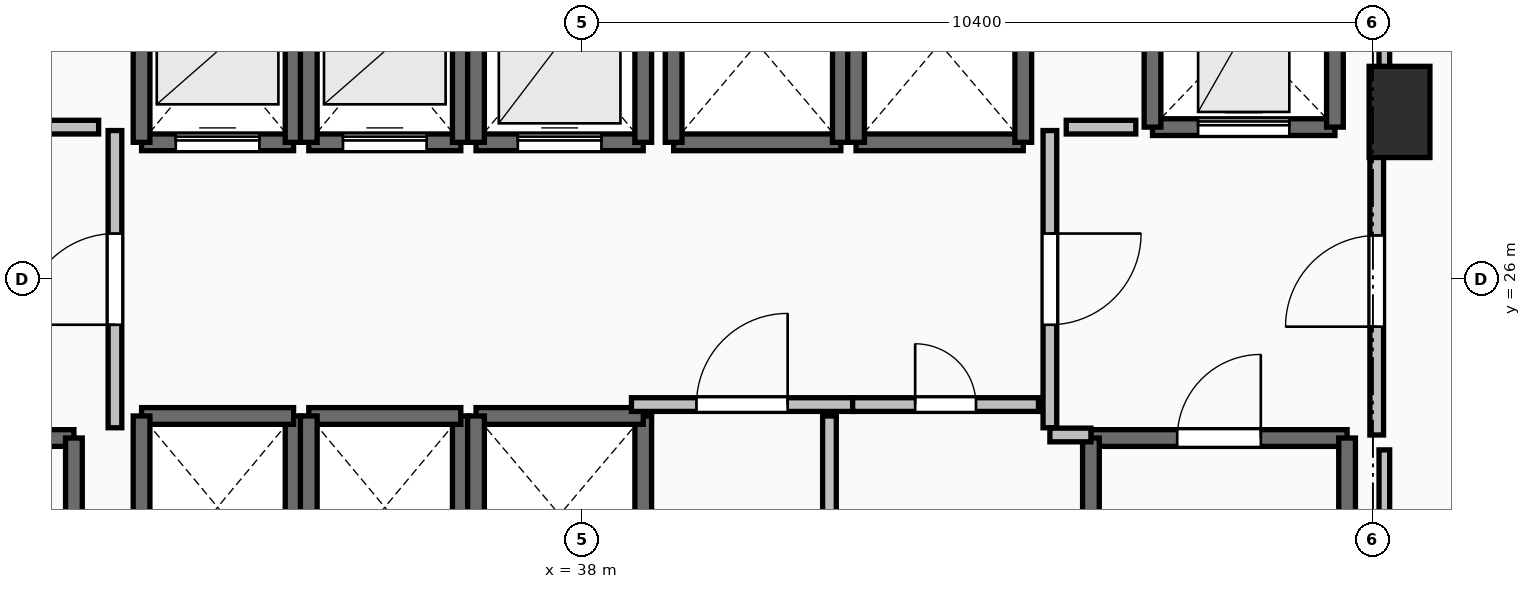
"""IFC4 building model, lengths in metres.
Left out: names, types, materials, properties, quantities, classifications, styles, units other than length and angle.
Written with IfcOpenShell. Run it as: python <this file> out.ifc"""

import sys

from ifc_helpers import new_model, si_unit, direction, frame, frame_2d, origin, origin_2d, place, context, subcontext, project, spatial, rectangle, extrude, element, fill, save


model = new_model("IFC4")
c1 = context("Model", 3, precision=1e-05, world=origin(), true_north=direction((0.0, 1.0)))
c2 = subcontext(c1, "Body", "Model", "MODEL_VIEW")
j1 = project(units=[si_unit("LENGTHUNIT", "METRE"), si_unit("PLANEANGLEUNIT", "RADIAN")], contexts=[c1])
p1 = place(None, origin())
s1 = spatial("IfcSite", under=j1, at=p1, CompositionType="ELEMENT")
p2 = place(p1, origin())
s2 = spatial("IfcBuilding", under=s1, at=p2, CompositionType="ELEMENT")
p3 = place(p2, frame((0.0, 0.0, 31.0)))
s3 = spatial("IfcBuildingStorey", under=s2, at=p3, CompositionType="ELEMENT", Elevation=31.0)
p4 = place(p3, frame((48.75, 28.2, 0.0), z_axis=(0.0, 0.0, 1.0), x_axis=(1.0, 0.0, 0.0)))
e1 = element("IfcColumn", 1, at=p4, inside=s3, PredefinedType="PILASTER", context=c2, shape_type="SweptSolid", body=[
    extrude(rectangle(XDim=0.8, YDim=1.2, at=origin_2d()), origin(), (0.0, 0.0, 1.0), 3.5),
])
p5 = place(p3, frame((27.94, 23.91, 0.0), z_axis=(0.0, 0.0, 1.0), x_axis=(1.0, 0.0, 0.0)))
e2 = element("IfcWall", 2, at=p5, inside=s3, PredefinedType="SOLIDWALL", context=c2, shape_type="SweptSolid", body=[
    extrude(rectangle(XDim=3.37, YDim=0.22, at=frame_2d((1.685, 0.0))), origin(), (0.0, 0.0, 1.0), 3.24),
])
p6 = place(p5, frame((1.135, 0.0, 0.0)))
e3 = element("IfcOpeningElement", 3, at=p6, cuts=e2, PredefinedType="OPENING", context=c2, shape_type="SweptSolid", body=[
    extrude(rectangle(XDim=1.1, YDim=2.15, at=frame_2d((0.55, 1.075))), frame((0.0, 0.125, 0.0), z_axis=(0.0, -1.0, 0.0), x_axis=(1.0, 0.0, 0.0)), (0.0, 0.0, 1.0), 0.25),
])
p7 = place(p3, frame((31.31, 23.91, 0.0), z_axis=(0.0, 0.0, 1.0), x_axis=(0.0, -1.0, 0.0)))
e4 = element("IfcWall", 4, at=p7, inside=s3, PredefinedType="SOLIDWALL", context=c2, shape_type="SweptSolid", body=[
    extrude(rectangle(XDim=7.42, YDim=0.22, at=frame_2d((3.71, 0.0))), origin(), (0.0, 0.0, 1.0), 3.24),
])
p8 = place(p3, frame((44.69, 23.91, 0.0), z_axis=(0.0, 0.0, 1.0), x_axis=(1.0, 0.0, 0.0)))
e5 = element("IfcWall", 5, at=p8, inside=s3, PredefinedType="SOLIDWALL", context=c2, shape_type="SweptSolid", body=[
    extrude(rectangle(XDim=3.37, YDim=0.22, at=frame_2d((1.685, 0.0))), origin(), (0.0, 0.0, 1.0), 3.24),
])
p9 = place(p8, frame((1.135, 0.0, 0.0)))
e6 = element("IfcOpeningElement", 6, at=p9, cuts=e5, PredefinedType="OPENING", context=c2, shape_type="SweptSolid", body=[
    extrude(rectangle(XDim=1.1, YDim=2.15, at=frame_2d((0.55, 1.075))), frame((0.0, 0.125, 0.0), z_axis=(0.0, -1.0, 0.0), x_axis=(1.0, 0.0, 0.0)), (0.0, 0.0, 1.0), 0.25),
])
for number, where, z_axis, x_axis in (
    (7, (48.06, 23.91, 0.0), (0.0, 0.0, 1.0), (0.0, -1.0, 0.0)),
    (8, (44.69, 16.49, 0.0), (0.0, 0.0, 1.0), (0.0, 1.0, 0.0)),
):
    element("IfcWall", number, at=place(p3, frame(where, z_axis=z_axis, x_axis=x_axis)), inside=s3, PredefinedType="SOLIDWALL", context=c2, shape_type="SweptSolid", body=[
        extrude(rectangle(XDim=7.42, YDim=0.22, at=frame_2d((3.71, 0.0))), origin(), (0.0, 0.0, 1.0), 3.24),
    ])
p10 = place(p3, frame((32.2, 27.8, 0.0), z_axis=(0.0, 0.0, 1.0), x_axis=(1.0, 0.0, 0.0)))
e9 = element("IfcWall", 9, at=p10, inside=s3, PredefinedType="SOLIDWALL", context=c2, shape_type="SweptSolid", body=[
    extrude(rectangle(XDim=2.0, YDim=0.22, at=frame_2d((1.0, 0.0))), origin(), (0.0, 0.0, 1.0), 3.24),
])
p11 = place(p10, frame((0.45, 0.0, 0.0)))
e10 = element("IfcOpeningElement", 10, at=p11, cuts=e9, PredefinedType="OPENING", context=c2, shape_type="SweptSolid", body=[
    extrude(rectangle(XDim=1.1, YDim=2.2, at=frame_2d((0.55, 1.1))), frame((0.0, 0.125, 0.0), z_axis=(0.0, -1.0, 0.0), x_axis=(1.0, 0.0, 0.0)), (0.0, 0.0, 1.0), 0.25),
])
for number, where, z_axis, x_axis in (
    (11, (34.2, 27.8, 0.0), (0.0, 0.0, 1.0), (0.0, 1.0, 0.0)),
    (12, (32.2, 30.2, 0.0), (0.0, 0.0, 1.0), (0.0, -1.0, 0.0)),
):
    element("IfcWall", number, at=place(p3, frame(where, z_axis=z_axis, x_axis=x_axis)), inside=s3, PredefinedType="SOLIDWALL", context=c2, shape_type="SweptSolid", body=[
        extrude(rectangle(XDim=2.4, YDim=0.22, at=frame_2d((1.2, 0.0))), origin(), (0.0, 0.0, 1.0), 3.24),
    ])
p12 = place(p3, frame((34.4, 27.8, 0.0), z_axis=(0.0, 0.0, 1.0), x_axis=(1.0, 0.0, 0.0)))
e13 = element("IfcWall", 13, at=p12, inside=s3, PredefinedType="SOLIDWALL", context=c2, shape_type="SweptSolid", body=[
    extrude(rectangle(XDim=2.0, YDim=0.22, at=frame_2d((1.0, 0.0))), origin(), (0.0, 0.0, 1.0), 3.24),
])
p13 = place(p12, frame((0.45, 0.0, 0.0)))
e14 = element("IfcOpeningElement", 14, at=p13, cuts=e13, PredefinedType="OPENING", context=c2, shape_type="SweptSolid", body=[
    extrude(rectangle(XDim=1.1, YDim=2.2, at=frame_2d((0.55, 1.1))), frame((0.0, 0.125, 0.0), z_axis=(0.0, -1.0, 0.0), x_axis=(1.0, 0.0, 0.0)), (0.0, 0.0, 1.0), 0.25),
])
for number, where, z_axis, x_axis in (
    (15, (36.4, 27.8, 0.0), (0.0, 0.0, 1.0), (0.0, 1.0, 0.0)),
    (16, (34.4, 30.2, 0.0), (0.0, 0.0, 1.0), (0.0, -1.0, 0.0)),
):
    element("IfcWall", number, at=place(p3, frame(where, z_axis=z_axis, x_axis=x_axis)), inside=s3, PredefinedType="SOLIDWALL", context=c2, shape_type="SweptSolid", body=[
        extrude(rectangle(XDim=2.4, YDim=0.22, at=frame_2d((1.2, 0.0))), origin(), (0.0, 0.0, 1.0), 3.24),
    ])
p14 = place(p3, frame((36.6, 27.8, 0.0), z_axis=(0.0, 0.0, 1.0), x_axis=(1.0, 0.0, 0.0)))
e17 = element("IfcWall", 17, at=p14, inside=s3, PredefinedType="SOLIDWALL", context=c2, shape_type="SweptSolid", body=[
    extrude(rectangle(XDim=2.2, YDim=0.22, at=frame_2d((1.1, 0.0))), origin(), (0.0, 0.0, 1.0), 3.24),
])
p15 = place(p14, frame((0.55, 0.0, 0.0)))
e18 = element("IfcOpeningElement", 18, at=p15, cuts=e17, PredefinedType="OPENING", context=c2, shape_type="SweptSolid", body=[
    extrude(rectangle(XDim=1.1, YDim=2.2, at=frame_2d((0.55, 1.1))), frame((0.0, 0.125, 0.0), z_axis=(0.0, -1.0, 0.0), x_axis=(1.0, 0.0, 0.0)), (0.0, 0.0, 1.0), 0.25),
])
for number, where, z_axis, x_axis in (
    (19, (38.8, 27.8, 0.0), (0.0, 0.0, 1.0), (0.0, 1.0, 0.0)),
    (20, (36.6, 30.4, 0.0), (0.0, 0.0, 1.0), (0.0, -1.0, 0.0)),
):
    element("IfcWall", number, at=place(p3, frame(where, z_axis=z_axis, x_axis=x_axis)), inside=s3, PredefinedType="SOLIDWALL", context=c2, shape_type="SweptSolid", body=[
        extrude(rectangle(XDim=2.6, YDim=0.22, at=frame_2d((1.3, 0.0))), origin(), (0.0, 0.0, 1.0), 3.24),
    ])
p16 = place(p3, frame((34.2, 21.8, 0.0), z_axis=(0.0, 0.0, 1.0), x_axis=(0.0, 1.0, 0.0)))
e21 = element("IfcWall", 21, at=p16, inside=s3, PredefinedType="SOLIDWALL", context=c2, shape_type="SweptSolid", body=[
    extrude(rectangle(XDim=2.4, YDim=0.22, at=frame_2d((1.2, 0.0))), origin(), (0.0, 0.0, 1.0), 3.24),
])
p17 = place(p3, frame((34.2, 24.2, 0.0), z_axis=(0.0, 0.0, 1.0), x_axis=(-1.0, 0.0, 0.0)))
e22 = element("IfcWall", 22, at=p17, inside=s3, PredefinedType="SOLIDWALL", context=c2, shape_type="SweptSolid", body=[
    extrude(rectangle(XDim=2.0, YDim=0.22, at=frame_2d((1.0, 0.0))), origin(), (0.0, 0.0, 1.0), 3.24),
])
for number, where, z_axis, x_axis in (
    (23, (32.2, 24.2, 0.0), (0.0, 0.0, 1.0), (0.0, -1.0, 0.0)),
    (24, (36.4, 21.8, 0.0), (0.0, 0.0, 1.0), (0.0, 1.0, 0.0)),
):
    element("IfcWall", number, at=place(p3, frame(where, z_axis=z_axis, x_axis=x_axis)), inside=s3, PredefinedType="SOLIDWALL", context=c2, shape_type="SweptSolid", body=[
        extrude(rectangle(XDim=2.4, YDim=0.22, at=frame_2d((1.2, 0.0))), origin(), (0.0, 0.0, 1.0), 3.24),
    ])
p18 = place(p3, frame((36.4, 24.2, 0.0), z_axis=(0.0, 0.0, 1.0), x_axis=(-1.0, 0.0, 0.0)))
e25 = element("IfcWall", 25, at=p18, inside=s3, PredefinedType="SOLIDWALL", context=c2, shape_type="SweptSolid", body=[
    extrude(rectangle(XDim=2.0, YDim=0.22, at=frame_2d((1.0, 0.0))), origin(), (0.0, 0.0, 1.0), 3.24),
])
p19 = place(p3, frame((34.4, 24.2, 0.0), z_axis=(0.0, 0.0, 1.0), x_axis=(0.0, -1.0, 0.0)))
e26 = element("IfcWall", 26, at=p19, inside=s3, PredefinedType="SOLIDWALL", context=c2, shape_type="SweptSolid", body=[
    extrude(rectangle(XDim=2.4, YDim=0.22, at=frame_2d((1.2, 0.0))), origin(), (0.0, 0.0, 1.0), 3.24),
])
p20 = place(p3, frame((38.8, 21.6, 0.0), z_axis=(0.0, 0.0, 1.0), x_axis=(0.0, 1.0, 0.0)))
e27 = element("IfcWall", 27, at=p20, inside=s3, PredefinedType="SOLIDWALL", context=c2, shape_type="SweptSolid", body=[
    extrude(rectangle(XDim=2.6, YDim=0.22, at=frame_2d((1.3, 0.0))), origin(), (0.0, 0.0, 1.0), 3.24),
])
p21 = place(p3, frame((38.8, 24.2, 0.0), z_axis=(0.0, 0.0, 1.0), x_axis=(-1.0, 0.0, 0.0)))
e28 = element("IfcWall", 28, at=p21, inside=s3, PredefinedType="SOLIDWALL", context=c2, shape_type="SweptSolid", body=[
    extrude(rectangle(XDim=2.2, YDim=0.22, at=frame_2d((1.1, 0.0))), origin(), (0.0, 0.0, 1.0), 3.24),
])
p22 = place(p3, frame((36.6, 24.2, 0.0), z_axis=(0.0, 0.0, 1.0), x_axis=(0.0, -1.0, 0.0)))
e29 = element("IfcWall", 29, at=p22, inside=s3, PredefinedType="SOLIDWALL", context=c2, shape_type="SweptSolid", body=[
    extrude(rectangle(XDim=2.6, YDim=0.22, at=frame_2d((1.3, 0.0))), origin(), (0.0, 0.0, 1.0), 3.24),
])
p23 = place(p3, frame((39.2, 27.8, 0.0), z_axis=(0.0, 0.0, 1.0), x_axis=(1.0, 0.0, 0.0)))
e30 = element("IfcWall", 30, at=p23, inside=s3, PredefinedType="SOLIDWALL", context=c2, shape_type="SweptSolid", body=[
    extrude(rectangle(XDim=2.2, YDim=0.22, at=frame_2d((1.1, 0.0))), origin(), (0.0, 0.0, 1.0), 3.24),
])
for number, where, z_axis, x_axis in (
    (31, (41.4, 27.8, 0.0), (0.0, 0.0, 1.0), (0.0, 1.0, 0.0)),
    (32, (39.2, 30.4, 0.0), (0.0, 0.0, 1.0), (0.0, -1.0, 0.0)),
):
    element("IfcWall", number, at=place(p3, frame(where, z_axis=z_axis, x_axis=x_axis)), inside=s3, PredefinedType="SOLIDWALL", context=c2, shape_type="SweptSolid", body=[
        extrude(rectangle(XDim=2.6, YDim=0.22, at=frame_2d((1.3, 0.0))), origin(), (0.0, 0.0, 1.0), 3.24),
    ])
p24 = place(p3, frame((41.6, 27.8, 0.0), z_axis=(0.0, 0.0, 1.0), x_axis=(1.0, 0.0, 0.0)))
e33 = element("IfcWall", 33, at=p24, inside=s3, PredefinedType="SOLIDWALL", context=c2, shape_type="SweptSolid", body=[
    extrude(rectangle(XDim=2.2, YDim=0.22, at=frame_2d((1.1, 0.0))), origin(), (0.0, 0.0, 1.0), 3.24),
])
for number, where, z_axis, x_axis in (
    (34, (43.8, 27.8, 0.0), (0.0, 0.0, 1.0), (0.0, 1.0, 0.0)),
    (35, (41.6, 30.4, 0.0), (0.0, 0.0, 1.0), (0.0, -1.0, 0.0)),
):
    element("IfcWall", number, at=place(p3, frame(where, z_axis=z_axis, x_axis=x_axis)), inside=s3, PredefinedType="SOLIDWALL", context=c2, shape_type="SweptSolid", body=[
        extrude(rectangle(XDim=2.6, YDim=0.22, at=frame_2d((1.3, 0.0))), origin(), (0.0, 0.0, 1.0), 3.24),
    ])
p25 = place(p3, frame((45.5, 28.0, 0.0), z_axis=(0.0, 0.0, 1.0), x_axis=(1.0, 0.0, 0.0)))
e36 = element("IfcWall", 36, at=p25, inside=s3, PredefinedType="SHEAR", context=c2, shape_type="SweptSolid", body=[
    extrude(rectangle(XDim=2.4, YDim=0.22, at=frame_2d((1.2, 0.0))), origin(), (0.0, 0.0, 1.0), 3.24),
])
p26 = place(p25, frame((0.6, 0.0, 0.0)))
e37 = element("IfcOpeningElement", 37, at=p26, cuts=e36, PredefinedType="OPENING", context=c2, shape_type="SweptSolid", body=[
    extrude(rectangle(XDim=1.2, YDim=2.2, at=frame_2d((0.6, 1.1))), frame((0.0, 0.125, 0.0), z_axis=(0.0, -1.0, 0.0), x_axis=(1.0, 0.0, 0.0)), (0.0, 0.0, 1.0), 0.25),
])
for number, where, z_axis, x_axis in (
    (38, (47.9, 28.0, 0.0), (0.0, 0.0, 1.0), (0.0, 1.0, 0.0)),
    (39, (45.5, 30.5, 0.0), (0.0, 0.0, 1.0), (0.0, -1.0, 0.0)),
):
    element("IfcWall", number, at=place(p3, frame(where, z_axis=z_axis, x_axis=x_axis)), inside=s3, PredefinedType="SHEAR", context=c2, shape_type="SweptSolid", body=[
        extrude(rectangle(XDim=2.5, YDim=0.22, at=frame_2d((1.25, 0.0))), origin(), (0.0, 0.0, 1.0), 3.24),
    ])
p27 = place(p3, frame((31.85, 24.045, 0.0), z_axis=(0.0, 0.0, 1.0), x_axis=(0.0, 1.0, 0.0)))
e40 = element("IfcWall", 40, at=p27, inside=s3, PredefinedType="PARTITIONING", context=c2, shape_type="SweptSolid", body=[
    extrude(rectangle(XDim=3.91, YDim=0.18, at=frame_2d((1.955, 0.0))), origin(), (0.0, 0.0, 1.0), 3.24),
])
p28 = place(p27, frame((1.355, 0.0, 0.0)))
e41 = element("IfcOpeningElement", 41, at=p28, cuts=e40, PredefinedType="OPENING", context=c2, shape_type="SweptSolid", body=[
    extrude(rectangle(XDim=1.2, YDim=2.15, at=frame_2d((0.6, 1.075))), frame((0.0, 0.105, 0.0), z_axis=(0.0, -1.0, 0.0), x_axis=(1.0, 0.0, 0.0)), (0.0, 0.0, 1.0), 0.21),
])
p29 = place(p3, frame((44.15, 27.955, 0.0), z_axis=(0.0, 0.0, 1.0), x_axis=(0.0, -1.0, 0.0)))
e42 = element("IfcWall", 42, at=p29, inside=s3, PredefinedType="PARTITIONING", context=c2, shape_type="SweptSolid", body=[
    extrude(rectangle(XDim=3.91, YDim=0.18, at=frame_2d((1.955, 0.0))), origin(), (0.0, 0.0, 1.0), 3.24),
])
p30 = place(p29, frame((1.355, 0.0, 0.0)))
e43 = element("IfcOpeningElement", 43, at=p30, cuts=e42, PredefinedType="OPENING", context=c2, shape_type="SweptSolid", body=[
    extrude(rectangle(XDim=1.2, YDim=2.15, at=frame_2d((0.6, 1.075))), frame((0.0, 0.105, 0.0), z_axis=(0.0, -1.0, 0.0), x_axis=(1.0, 0.0, 0.0)), (0.0, 0.0, 1.0), 0.21),
])
p31 = place(p3, frame((44.15, 23.95, 0.0), z_axis=(0.0, 0.0, 1.0), x_axis=(1.0, 0.0, 0.0)))
e44 = element("IfcWall", 44, at=p31, inside=s3, PredefinedType="PARTITIONING", context=c2, shape_type="SweptSolid", body=[
    extrude(rectangle(XDim=0.54, YDim=0.18, at=frame_2d((0.27, 0.0))), origin(), (0.0, 0.0, 1.0), 3.24),
])
p32 = place(p3, frame((48.45, 23.95, 0.0), z_axis=(0.0, 0.0, 1.0), x_axis=(0.0, 1.0, 0.0)))
e45 = element("IfcWall", 45, at=p32, inside=s3, PredefinedType="PARTITIONING", context=c2, shape_type="SweptSolid", body=[
    extrude(rectangle(XDim=4.05, YDim=0.18, at=frame_2d((2.025, 0.0))), origin(), (0.0, 0.0, 1.0), 3.24),
])
p33 = place(p32, frame((1.425, 0.0, 0.0)))
e46 = element("IfcOpeningElement", 46, at=p33, cuts=e45, PredefinedType="OPENING", context=c2, shape_type="SweptSolid", body=[
    extrude(rectangle(XDim=1.2, YDim=2.15, at=frame_2d((0.6, 1.075))), frame((0.0, 0.105, 0.0), z_axis=(0.0, -1.0, 0.0), x_axis=(1.0, 0.0, 0.0)), (0.0, 0.0, 1.0), 0.21),
])
p34 = place(p3, frame((38.645, 24.35, 0.0), z_axis=(0.0, 0.0, 1.0), x_axis=(1.0, 0.0, 0.0)))
e47 = element("IfcWall", 47, at=p34, inside=s3, PredefinedType="PARTITIONING", context=c2, shape_type="SweptSolid", body=[
    extrude(rectangle(XDim=2.91, YDim=0.18, at=frame_2d((1.455, 0.0))), origin(), (0.0, 0.0, 1.0), 3.24),
])
p35 = place(p34, frame((0.855, 0.0, 0.0)))
e48 = element("IfcOpeningElement", 48, at=p35, cuts=e47, PredefinedType="OPENING", context=c2, shape_type="SweptSolid", body=[
    extrude(rectangle(XDim=1.2, YDim=2.15, at=frame_2d((0.6, 1.075))), frame((0.0, 0.105, 0.0), z_axis=(0.0, -1.0, 0.0), x_axis=(1.0, 0.0, 0.0)), (0.0, 0.0, 1.0), 0.21),
])
p36 = place(p3, frame((41.555, 24.35, 0.0), z_axis=(0.0, 0.0, 1.0), x_axis=(1.0, 0.0, 0.0)))
e49 = element("IfcWall", 49, at=p36, inside=s3, PredefinedType="PARTITIONING", context=c2, shape_type="SweptSolid", body=[
    extrude(rectangle(XDim=2.445, YDim=0.18, at=frame_2d((1.223, 0.0))), origin(), (0.0, 0.0, 1.0), 3.24),
])
p37 = place(p36, frame((0.823, 0.0, 0.0)))
e50 = element("IfcOpeningElement", 50, at=p37, cuts=e49, PredefinedType="OPENING", context=c2, shape_type="SweptSolid", body=[
    extrude(rectangle(XDim=0.8, YDim=2.05, at=frame_2d((0.4, 1.025))), frame((0.0, 0.105, 0.0), z_axis=(0.0, -1.0, 0.0), x_axis=(1.0, 0.0, 0.0)), (0.0, 0.0, 1.0), 0.21),
])
p38 = place(p3, frame((41.25, 16.32, 0.0), z_axis=(0.0, 0.0, 1.0), x_axis=(0.0, 1.0, 0.0)))
e51 = element("IfcWall", 51, at=p38, inside=s3, PredefinedType="PARTITIONING", context=c2, shape_type="SweptSolid", body=[
    extrude(rectangle(XDim=7.88, YDim=0.18, at=frame_2d((3.94, 0.0))), origin(), (0.0, 0.0, 1.0), 3.24),
])
p39 = place(p38, frame((3.54, 0.0, 0.0)))
e52 = element("IfcOpeningElement", 52, at=p39, cuts=e51, PredefinedType="OPENING", context=c2, shape_type="SweptSolid", body=[
    extrude(rectangle(XDim=0.8, YDim=2.05, at=frame_2d((0.4, 1.025))), frame((0.0, 0.105, 0.0), z_axis=(0.0, -1.0, 0.0), x_axis=(1.0, 0.0, 0.0)), (0.0, 0.0, 1.0), 0.21),
])
for number, where, z_axis, x_axis in (
    (53, (31.635, 28.0, 0.0), (0.0, 0.0, 1.0), (-1.0, 0.0, 0.0)),
    (54, (45.28, 28.0, 0.0), (0.0, 0.0, 1.0), (-1.0, 0.0, 0.0)),
):
    element("IfcWall", number, at=place(p3, frame(where, z_axis=z_axis, x_axis=x_axis)), inside=s3, PredefinedType="PARTITIONING", context=c2, shape_type="SweptSolid", body=[
        extrude(rectangle(XDim=0.915, YDim=0.18, at=frame_2d((0.458, 0.0))), origin(), (0.0, 0.0, 1.0), 3.24),
    ])
p40 = place(p3, frame((48.55, 33.45, 0.0), z_axis=(0.0, 0.0, 1.0), x_axis=(0.0, -1.0, 0.0)))
e55 = element("IfcWall", 55, at=p40, inside=s3, PredefinedType="PARTITIONING", context=c2, shape_type="SweptSolid", body=[
    extrude(rectangle(XDim=5.254, YDim=0.14, at=frame_2d((2.627, 0.0))), origin(), (0.0, 0.0, 1.0), 2.432),
])
p41 = place(p3, frame((48.55, 23.754, 0.0), z_axis=(0.0, 0.0, 1.0), x_axis=(0.0, -1.0, 0.0)))
e56 = element("IfcWall", 56, at=p41, inside=s3, PredefinedType="PARTITIONING", context=c2, shape_type="SweptSolid", body=[
    extrude(rectangle(XDim=7.514, YDim=0.14, at=frame_2d((3.757, 0.0))), origin(), (0.0, 0.0, 1.0), 2.432),
])
p42 = place(p9, origin())
e57 = element("IfcDoor", 57, at=p42, inside=s3, OperationType="SINGLE_SWING_RIGHT", PredefinedType="DOOR", context=c2, shape_type="SweptSolid", body=[
    extrude(rectangle(XDim=1.1, YDim=2.15, at=frame_2d((0.55, 1.075))), frame((0.0, 0.025, 0.0), z_axis=(0.0, -1.0, 0.0), x_axis=(1.0, 0.0, 0.0)), (0.0, 0.0, 1.0), 0.05),
])
fill(e6, e57)
p43 = place(p11, origin())
e58 = element("IfcDoor", 58, at=p43, inside=s3, OperationType="SLIDING_TO_LEFT", PredefinedType="DOOR", context=c2, shape_type="SweptSolid", body=[
    extrude(rectangle(XDim=1.1, YDim=2.2, at=frame_2d((0.55, 1.1))), frame((0.0, 0.025, 0.0), z_axis=(0.0, -1.0, 0.0), x_axis=(1.0, 0.0, 0.0)), (0.0, 0.0, 1.0), 0.05),
])
fill(e10, e58)
p44 = place(p13, origin())
e59 = element("IfcDoor", 59, at=p44, inside=s3, OperationType="SLIDING_TO_LEFT", PredefinedType="DOOR", context=c2, shape_type="SweptSolid", body=[
    extrude(rectangle(XDim=1.1, YDim=2.2, at=frame_2d((0.55, 1.1))), frame((0.0, 0.025, 0.0), z_axis=(0.0, -1.0, 0.0), x_axis=(1.0, 0.0, 0.0)), (0.0, 0.0, 1.0), 0.05),
])
fill(e14, e59)
p45 = place(p15, origin())
e60 = element("IfcDoor", 60, at=p45, inside=s3, OperationType="SLIDING_TO_LEFT", PredefinedType="DOOR", context=c2, shape_type="SweptSolid", body=[
    extrude(rectangle(XDim=1.1, YDim=2.2, at=frame_2d((0.55, 1.1))), frame((0.0, 0.025, 0.0), z_axis=(0.0, -1.0, 0.0), x_axis=(1.0, 0.0, 0.0)), (0.0, 0.0, 1.0), 0.05),
])
fill(e18, e60)
p46 = place(p26, origin())
e61 = element("IfcDoor", 61, at=p46, inside=s3, OperationType="SLIDING_TO_LEFT", PredefinedType="DOOR", context=c2, shape_type="SweptSolid", body=[
    extrude(rectangle(XDim=1.2, YDim=2.2, at=frame_2d((0.6, 1.1))), frame((0.0, 0.025, 0.0), z_axis=(0.0, -1.0, 0.0), x_axis=(1.0, 0.0, 0.0)), (0.0, 0.0, 1.0), 0.05),
])
fill(e37, e61)
p47 = place(p28, origin())
e62 = element("IfcDoor", 62, at=p47, inside=s3, OperationType="SINGLE_SWING_LEFT", PredefinedType="DOOR", context=c2, shape_type="SweptSolid", body=[
    extrude(rectangle(XDim=1.2, YDim=2.15, at=frame_2d((0.6, 1.075))), frame((0.0, 0.025, 0.0), z_axis=(0.0, -1.0, 0.0), x_axis=(1.0, 0.0, 0.0)), (0.0, 0.0, 1.0), 0.05),
])
fill(e41, e62)
p48 = place(p30, origin())
e63 = element("IfcDoor", 63, at=p48, inside=s3, OperationType="SINGLE_SWING_LEFT", PredefinedType="DOOR", context=c2, shape_type="SweptSolid", body=[
    extrude(rectangle(XDim=1.2, YDim=2.15, at=frame_2d((0.6, 1.075))), frame((0.0, 0.025, 0.0), z_axis=(0.0, -1.0, 0.0), x_axis=(1.0, 0.0, 0.0)), (0.0, 0.0, 1.0), 0.05),
])
fill(e43, e63)
p49 = place(p33, origin())
e64 = element("IfcDoor", 64, at=p49, inside=s3, OperationType="SINGLE_SWING_LEFT", PredefinedType="DOOR", context=c2, shape_type="SweptSolid", body=[
    extrude(rectangle(XDim=1.2, YDim=2.15, at=frame_2d((0.6, 1.075))), frame((0.0, 0.025, 0.0), z_axis=(0.0, -1.0, 0.0), x_axis=(1.0, 0.0, 0.0)), (0.0, 0.0, 1.0), 0.05),
])
fill(e46, e64)
p50 = place(p35, origin())
e65 = element("IfcDoor", 65, at=p50, inside=s3, OperationType="SINGLE_SWING_RIGHT", PredefinedType="DOOR", context=c2, shape_type="SweptSolid", body=[
    extrude(rectangle(XDim=1.2, YDim=2.15, at=frame_2d((0.6, 1.075))), frame((0.0, 0.025, 0.0), z_axis=(0.0, -1.0, 0.0), x_axis=(1.0, 0.0, 0.0)), (0.0, 0.0, 1.0), 0.05),
])
fill(e48, e65)
p51 = place(p37, origin())
e66 = element("IfcDoor", 66, at=p51, inside=s3, OperationType="SINGLE_SWING_LEFT", PredefinedType="DOOR", context=c2, shape_type="SweptSolid", body=[
    extrude(rectangle(XDim=0.8, YDim=2.05, at=frame_2d((0.4, 1.025))), frame((0.0, 0.025, 0.0), z_axis=(0.0, -1.0, 0.0), x_axis=(1.0, 0.0, 0.0)), (0.0, 0.0, 1.0), 0.05),
])
fill(e50, e66)
save(model, sys.argv[1])
